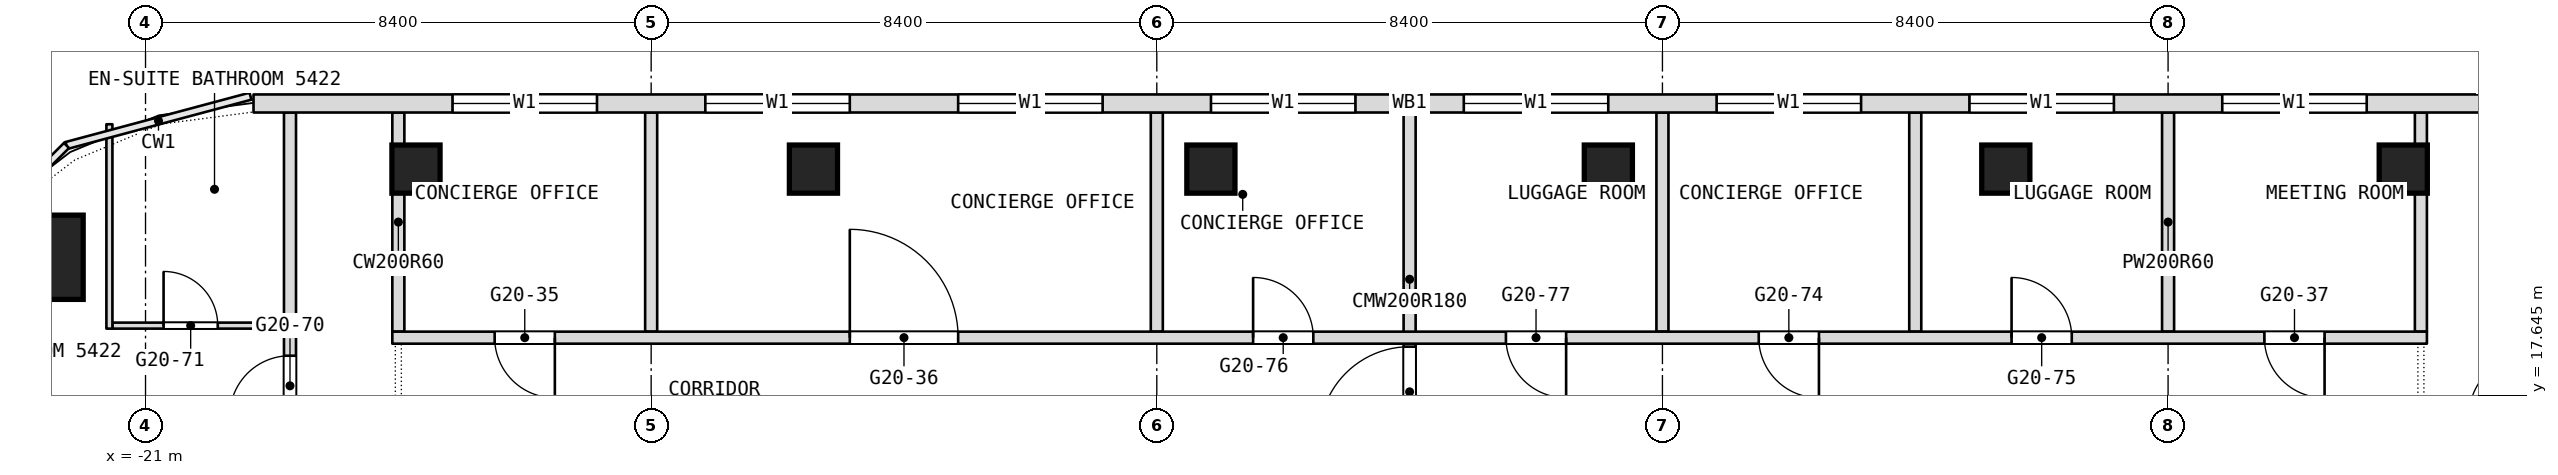
"""IFC4 building model, lengths in metres.
Left out: names, types, materials, properties, quantities, classifications, styles, units other than length and angle.
Written with IfcOpenShell. Run it as: python <this file> out.ifc"""

import sys

from ifc_helpers import new_model, si_unit, direction, frame, frame_2d, origin, origin_2d, place, context, subcontext, project, spatial, rectangle, extrude, element, fill, save


model = new_model("IFC4")
c1 = context("Model", 3, precision=1e-05, world=origin(), true_north=direction((0.0, 1.0)))
c2 = subcontext(c1, "Body", "Model", "MODEL_VIEW")
j1 = project(units=[si_unit("LENGTHUNIT", "METRE"), si_unit("PLANEANGLEUNIT", "RADIAN")], contexts=[c1])
p1 = place(None, origin())
s1 = spatial("IfcSite", under=j1, at=p1, CompositionType="ELEMENT")
p2 = place(p1, origin())
s2 = spatial("IfcBuilding", under=s1, at=p2, CompositionType="ELEMENT")
p3 = place(p2, frame((0.0, 0.0, 230.9)))
s3 = spatial("IfcBuildingStorey", under=s2, at=p3, CompositionType="ELEMENT", Elevation=230.9)
p4 = place(p3, frame((-22.736, 19.936, 0.0), z_axis=(0.0, 0.0, 1.0), x_axis=(1.0, 0.0, 0.0)))
e1 = element("IfcColumn", 1, at=p4, inside=s3, PredefinedType="COLUMN", context=c2, shape_type="SweptSolid", body=[
    extrude(rectangle(XDim=1.4, YDim=1.4, at=origin_2d()), origin(), (0.0, 0.0, 1.0), 3.6),
])
for number, where, z_axis, x_axis in (
    (2, (-16.507, 21.4, 0.0), (0.0, 0.0, 1.0), (1.0, 0.0, 0.0)),
    (3, (-9.904, 21.4, 0.0), (0.0, 0.0, 1.0), (1.0, 0.0, 0.0)),
    (4, (-3.302, 21.4, 0.0), (0.0, 0.0, 1.0), (1.0, 0.0, 0.0)),
    (5, (3.302, 21.4, 0.0), (0.0, 0.0, 1.0), (1.0, 0.0, 0.0)),
    (6, (9.904, 21.4, 0.0), (0.0, 0.0, 1.0), (1.0, 0.0, 0.0)),
    (7, (16.507, 21.4, 0.0), (0.0, 0.0, 1.0), (1.0, 0.0, 0.0)),
):
    element("IfcColumn", number, at=place(p3, frame(where, z_axis=z_axis, x_axis=x_axis)), inside=s3, PredefinedType="COLUMN", context=c2, shape_type="SweptSolid", body=[
        extrude(rectangle(XDim=0.8, YDim=0.8, at=origin_2d()), origin(), (0.0, 0.0, 1.0), 3.6),
    ])
for number, where, z_axis, x_axis in (
    (8, (16.8, 18.7, 0.0), (0.0, 0.0, 1.0), (0.0, 1.0, 0.0)),
    (9, (12.6, 18.7, 0.0), (0.0, 0.0, 1.0), (0.0, 1.0, 0.0)),
    (10, (8.4, 18.7, 0.0), (0.0, 0.0, 1.0), (0.0, 1.0, 0.0)),
    (11, (4.2, 18.7, 0.0), (0.0, 0.0, 1.0), (0.0, 1.0, 0.0)),
):
    element("IfcWall", number, at=place(p3, frame(where, z_axis=z_axis, x_axis=x_axis)), inside=s3, PredefinedType="PARTITIONING", context=c2, shape_type="SweptSolid", body=[
        extrude(rectangle(XDim=3.64, YDim=0.2, at=frame_2d((1.82, 0.0))), origin(), (0.0, 0.0, 1.0), 3.34),
    ])
p5 = place(p3, frame((0.0, 16.8, 0.0), z_axis=(0.0, 0.0, 1.0), x_axis=(0.0, 1.0, 0.0)))
e12 = element("IfcWall", 12, at=p5, inside=s3, PredefinedType="PARTITIONING", context=c2, shape_type="SweptSolid", body=[
    extrude(rectangle(XDim=5.54, YDim=0.2, at=frame_2d((2.77, 0.0))), origin(), (0.0, 0.0, 1.0), 3.34),
])
p6 = place(p5, frame((0.15, 0.0, 0.0)))
e13 = element("IfcOpeningElement", 13, at=p6, cuts=e12, PredefinedType="OPENING", context=c2, shape_type="SweptSolid", body=[
    extrude(rectangle(XDim=1.5, YDim=2.1, at=frame_2d((0.75, 1.05))), frame((0.0, 0.1, 0.0), z_axis=(0.0, -1.0, 0.0), x_axis=(1.0, 0.0, 0.0)), (0.0, 0.0, 1.0), 0.2),
])
for number, where, z_axis, x_axis in (
    (14, (-4.2, 18.7, 0.0), (0.0, 0.0, 1.0), (0.0, 1.0, 0.0)),
    (15, (-12.6, 18.7, 0.0), (0.0, 0.0, 1.0), (0.0, 1.0, 0.0)),
    (16, (-16.8, 18.7, 0.0), (0.0, 0.0, 1.0), (0.0, 1.0, 0.0)),
):
    element("IfcWall", number, at=place(p3, frame(where, z_axis=z_axis, x_axis=x_axis)), inside=s3, PredefinedType="PARTITIONING", context=c2, shape_type="SweptSolid", body=[
        extrude(rectangle(XDim=3.64, YDim=0.2, at=frame_2d((1.82, 0.0))), origin(), (0.0, 0.0, 1.0), 3.34),
    ])
p7 = place(p3, frame((-18.6, -26.751, 0.0), z_axis=(0.0, 0.0, 1.0), x_axis=(0.0, 1.0, 0.0)))
e17 = element("IfcWall", 17, at=p7, inside=s3, PredefinedType="PARTITIONING", context=c2, shape_type="SweptSolid", body=[
    extrude(rectangle(XDim=49.091, YDim=0.2, at=frame_2d((24.545, 0.0))), origin(), (0.0, 0.0, 1.0), 3.34),
])
p8 = place(p7, frame((3.413, 0.0, 0.0)))
e18 = element("IfcOpeningElement", 18, at=p8, cuts=e17, PredefinedType="OPENING", context=c2, shape_type="SweptSolid", body=[
    extrude(rectangle(XDim=1.0, YDim=2.1, at=frame_2d((0.5, 1.05))), frame((0.0, 0.1, 0.0), z_axis=(0.0, -1.0, 0.0), x_axis=(1.0, 0.0, 0.0)), (0.0, 0.0, 1.0), 0.2),
])
p9 = place(p7, frame((5.838, 0.0, 0.0)))
e19 = element("IfcOpeningElement", 19, at=p9, cuts=e17, PredefinedType="OPENING", context=c2, shape_type="SweptSolid", body=[
    extrude(rectangle(XDim=1.0, YDim=2.1, at=frame_2d((0.5, 1.05))), frame((0.0, 0.1, 0.0), z_axis=(0.0, -1.0, 0.0), x_axis=(1.0, 0.0, 0.0)), (0.0, 0.0, 1.0), 0.2),
])
p10 = place(p7, frame((13.551, 0.0, 0.0)))
e20 = element("IfcOpeningElement", 20, at=p10, cuts=e17, PredefinedType="OPENING", context=c2, shape_type="SweptSolid", body=[
    extrude(rectangle(XDim=1.1, YDim=2.1, at=frame_2d((0.55, 1.05))), frame((0.0, 0.1, 0.0), z_axis=(0.0, -1.0, 0.0), x_axis=(1.0, 0.0, 0.0)), (0.0, 0.0, 1.0), 0.2),
])
p11 = place(p7, frame((22.051, 0.0, 0.0)))
e21 = element("IfcOpeningElement", 21, at=p11, cuts=e17, PredefinedType="OPENING", context=c2, shape_type="SweptSolid", body=[
    extrude(rectangle(XDim=1.1, YDim=2.1, at=frame_2d((0.55, 1.05))), frame((0.0, 0.1, 0.0), z_axis=(0.0, -1.0, 0.0), x_axis=(1.0, 0.0, 0.0)), (0.0, 0.0, 1.0), 0.2),
])
p12 = place(p7, frame((27.151, 0.0, 0.0)))
e22 = element("IfcOpeningElement", 22, at=p12, cuts=e17, PredefinedType="OPENING", context=c2, shape_type="SweptSolid", body=[
    extrude(rectangle(XDim=1.0, YDim=2.1, at=frame_2d((0.5, 1.05))), frame((0.0, 0.1, 0.0), z_axis=(0.0, -1.0, 0.0), x_axis=(1.0, 0.0, 0.0)), (0.0, 0.0, 1.0), 0.2),
])
p13 = place(p7, frame((33.751, 0.0, 0.0)))
e23 = element("IfcOpeningElement", 23, at=p13, cuts=e17, PredefinedType="OPENING", context=c2, shape_type="SweptSolid", body=[
    extrude(rectangle(XDim=1.0, YDim=2.1, at=frame_2d((0.5, 1.05))), frame((0.0, 0.1, 0.0), z_axis=(0.0, -1.0, 0.0), x_axis=(1.0, 0.0, 0.0)), (0.0, 0.0, 1.0), 0.2),
])
p14 = place(p7, frame((37.951, 0.0, 0.0)))
e24 = element("IfcOpeningElement", 24, at=p14, cuts=e17, PredefinedType="OPENING", context=c2, shape_type="SweptSolid", body=[
    extrude(rectangle(XDim=1.0, YDim=2.1, at=frame_2d((0.5, 1.05))), frame((0.0, 0.1, 0.0), z_axis=(0.0, -1.0, 0.0), x_axis=(1.0, 0.0, 0.0)), (0.0, 0.0, 1.0), 0.2),
])
p15 = place(p7, frame((39.751, 0.0, 0.0)))
e25 = element("IfcOpeningElement", 25, at=p15, cuts=e17, PredefinedType="OPENING", context=c2, shape_type="SweptSolid", body=[
    extrude(rectangle(XDim=1.0, YDim=2.1, at=frame_2d((0.5, 1.05))), frame((0.0, 0.1, 0.0), z_axis=(0.0, -1.0, 0.0), x_axis=(1.0, 0.0, 0.0)), (0.0, 0.0, 1.0), 0.2),
])
p16 = place(p7, frame((44.051, 0.0, 0.0)))
e26 = element("IfcOpeningElement", 26, at=p16, cuts=e17, PredefinedType="OPENING", context=c2, shape_type="SweptSolid", body=[
    extrude(rectangle(XDim=1.0, YDim=2.1, at=frame_2d((0.5, 1.05))), frame((0.0, 0.1, 0.0), z_axis=(0.0, -1.0, 0.0), x_axis=(1.0, 0.0, 0.0)), (0.0, 0.0, 1.0), 0.2),
])
p17 = place(p3, frame((-16.9, 18.6, 0.0), z_axis=(0.0, 0.0, 1.0), x_axis=(1.0, 0.0, 0.0)))
e27 = element("IfcWall", 27, at=p17, inside=s3, PredefinedType="PARTITIONING", context=c2, shape_type="SweptSolid", body=[
    extrude(rectangle(XDim=33.8, YDim=0.2, at=frame_2d((16.9, 0.0))), origin(), (0.0, 0.0, 1.0), 3.34),
])
p18 = place(p17, frame((1.7, 0.0, 0.0)))
e28 = element("IfcOpeningElement", 28, at=p18, cuts=e27, PredefinedType="OPENING", context=c2, shape_type="SweptSolid", body=[
    extrude(rectangle(XDim=1.0, YDim=2.1, at=frame_2d((0.5, 1.05))), frame((0.0, 0.1, 0.0), z_axis=(0.0, -1.0, 0.0), x_axis=(1.0, 0.0, 0.0)), (0.0, 0.0, 1.0), 0.2),
])
p19 = place(p17, frame((7.6, 0.0, 0.0)))
e29 = element("IfcOpeningElement", 29, at=p19, cuts=e27, PredefinedType="OPENING", context=c2, shape_type="SweptSolid", body=[
    extrude(rectangle(XDim=1.8, YDim=2.1, at=frame_2d((0.9, 1.05))), frame((0.0, 0.1, 0.0), z_axis=(0.0, -1.0, 0.0), x_axis=(1.0, 0.0, 0.0)), (0.0, 0.0, 1.0), 0.2),
])
p20 = place(p17, frame((31.1, 0.0, 0.0)))
e30 = element("IfcOpeningElement", 30, at=p20, cuts=e27, PredefinedType="OPENING", context=c2, shape_type="SweptSolid", body=[
    extrude(rectangle(XDim=1.0, YDim=2.1, at=frame_2d((0.5, 1.05))), frame((0.0, 0.1, 0.0), z_axis=(0.0, -1.0, 0.0), x_axis=(1.0, 0.0, 0.0)), (0.0, 0.0, 1.0), 0.2),
])
p21 = place(p17, frame((22.7, 0.0, 0.0)))
e31 = element("IfcOpeningElement", 31, at=p21, cuts=e27, PredefinedType="OPENING", context=c2, shape_type="SweptSolid", body=[
    extrude(rectangle(XDim=1.0, YDim=2.1, at=frame_2d((0.5, 1.05))), frame((0.0, 0.1, 0.0), z_axis=(0.0, -1.0, 0.0), x_axis=(1.0, 0.0, 0.0)), (0.0, 0.0, 1.0), 0.2),
])
p22 = place(p17, frame((26.9, 0.0, 0.0)))
e32 = element("IfcOpeningElement", 32, at=p22, cuts=e27, PredefinedType="OPENING", context=c2, shape_type="SweptSolid", body=[
    extrude(rectangle(XDim=1.0, YDim=2.1, at=frame_2d((0.5, 1.05))), frame((0.0, 0.1, 0.0), z_axis=(0.0, -1.0, 0.0), x_axis=(1.0, 0.0, 0.0)), (0.0, 0.0, 1.0), 0.2),
])
p23 = place(p17, frame((14.3, 0.0, 0.0)))
e33 = element("IfcOpeningElement", 33, at=p23, cuts=e27, PredefinedType="OPENING", context=c2, shape_type="SweptSolid", body=[
    extrude(rectangle(XDim=1.0, YDim=2.1, at=frame_2d((0.5, 1.05))), frame((0.0, 0.1, 0.0), z_axis=(0.0, -1.0, 0.0), x_axis=(1.0, 0.0, 0.0)), (0.0, 0.0, 1.0), 0.2),
])
p24 = place(p17, frame((18.5, 0.0, 0.0)))
e34 = element("IfcOpeningElement", 34, at=p24, cuts=e27, PredefinedType="OPENING", context=c2, shape_type="SweptSolid", body=[
    extrude(rectangle(XDim=1.0, YDim=2.1, at=frame_2d((0.5, 1.05))), frame((0.0, 0.1, 0.0), z_axis=(0.0, -1.0, 0.0), x_axis=(1.0, 0.0, 0.0)), (0.0, 0.0, 1.0), 0.2),
])
p25 = place(p3, frame((-21.55, 18.8, 0.0), z_axis=(0.0, 0.0, 1.0), x_axis=(1.0, 0.0, 0.0)))
e35 = element("IfcWall", 35, at=p25, inside=s3, PredefinedType="PARTITIONING", context=c2, shape_type="SweptSolid", body=[
    extrude(rectangle(XDim=2.85, YDim=0.1, at=frame_2d((1.425, 0.0))), origin(), (0.0, 0.0, 1.0), 3.34),
])
p26 = place(p25, frame((0.85, 0.0, 0.0)))
e36 = element("IfcOpeningElement", 36, at=p26, cuts=e35, PredefinedType="OPENING", context=c2, shape_type="SweptSolid", body=[
    extrude(rectangle(XDim=0.9, YDim=2.1, at=frame_2d((0.45, 1.05))), frame((0.0, 0.05, 0.0), z_axis=(0.0, -1.0, 0.0), x_axis=(1.0, 0.0, 0.0)), (0.0, 0.0, 1.0), 0.1),
])
p27 = place(p3, frame((-21.6, 18.75, 0.0), z_axis=(0.0, 0.0, 1.0), x_axis=(0.0, 1.0, 0.0)))
e37 = element("IfcWall", 37, at=p27, inside=s3, PredefinedType="PARTITIONING", context=c2, shape_type="SweptSolid", body=[
    extrude(rectangle(XDim=3.395, YDim=0.1, at=frame_2d((1.698, 0.0))), origin(), (0.0, 0.0, 1.0), 3.34),
])
p28 = place(p3, frame((19.206, 22.49, 0.0), z_axis=(0.0, 0.0, 1.0), x_axis=(-1.0, 0.0, 0.0)))
e38 = element("IfcWall", 38, at=p28, inside=s3, PredefinedType="NOTDEFINED", context=c2, shape_type="SweptSolid", body=[
    extrude(rectangle(XDim=38.412, YDim=0.3, at=frame_2d((19.206, 0.0))), origin(), (0.0, 0.0, 1.0), 3.6),
])
p29 = place(p28, frame((3.306, 0.0, 0.9)))
e39 = element("IfcOpeningElement", 39, at=p29, cuts=e38, PredefinedType="OPENING", context=c2, shape_type="SweptSolid", body=[
    extrude(rectangle(XDim=2.4, YDim=2.1, at=frame_2d((1.2, 1.05))), frame((0.0, 0.15, 0.0), z_axis=(0.0, -1.0, 0.0), x_axis=(1.0, 0.0, 0.0)), (0.0, 0.0, 1.0), 0.3),
])
p30 = place(p28, frame((7.506, 0.0, 0.9)))
e40 = element("IfcOpeningElement", 40, at=p30, cuts=e38, PredefinedType="OPENING", context=c2, shape_type="SweptSolid", body=[
    extrude(rectangle(XDim=2.4, YDim=2.1, at=frame_2d((1.2, 1.05))), frame((0.0, 0.15, 0.0), z_axis=(0.0, -1.0, 0.0), x_axis=(1.0, 0.0, 0.0)), (0.0, 0.0, 1.0), 0.3),
])
p31 = place(p28, frame((11.706, 0.0, 0.9)))
e41 = element("IfcOpeningElement", 41, at=p31, cuts=e38, PredefinedType="OPENING", context=c2, shape_type="SweptSolid", body=[
    extrude(rectangle(XDim=2.4, YDim=2.1, at=frame_2d((1.2, 1.05))), frame((0.0, 0.15, 0.0), z_axis=(0.0, -1.0, 0.0), x_axis=(1.0, 0.0, 0.0)), (0.0, 0.0, 1.0), 0.3),
])
p32 = place(p28, frame((15.906, 0.0, 0.9)))
e42 = element("IfcOpeningElement", 42, at=p32, cuts=e38, PredefinedType="OPENING", context=c2, shape_type="SweptSolid", body=[
    extrude(rectangle(XDim=2.4, YDim=2.1, at=frame_2d((1.2, 1.05))), frame((0.0, 0.15, 0.0), z_axis=(0.0, -1.0, 0.0), x_axis=(1.0, 0.0, 0.0)), (0.0, 0.0, 1.0), 0.3),
])
p33 = place(p28, frame((20.106, 0.0, 0.9)))
e43 = element("IfcOpeningElement", 43, at=p33, cuts=e38, PredefinedType="OPENING", context=c2, shape_type="SweptSolid", body=[
    extrude(rectangle(XDim=2.4, YDim=2.1, at=frame_2d((1.2, 1.05))), frame((0.0, 0.15, 0.0), z_axis=(0.0, -1.0, 0.0), x_axis=(1.0, 0.0, 0.0)), (0.0, 0.0, 1.0), 0.3),
])
p34 = place(p28, frame((24.306, 0.0, 0.9)))
e44 = element("IfcOpeningElement", 44, at=p34, cuts=e38, PredefinedType="OPENING", context=c2, shape_type="SweptSolid", body=[
    extrude(rectangle(XDim=2.4, YDim=2.1, at=frame_2d((1.2, 1.05))), frame((0.0, 0.15, 0.0), z_axis=(0.0, -1.0, 0.0), x_axis=(1.0, 0.0, 0.0)), (0.0, 0.0, 1.0), 0.3),
])
p35 = place(p28, frame((28.506, 0.0, 0.9)))
e45 = element("IfcOpeningElement", 45, at=p35, cuts=e38, PredefinedType="OPENING", context=c2, shape_type="SweptSolid", body=[
    extrude(rectangle(XDim=2.4, YDim=2.1, at=frame_2d((1.2, 1.05))), frame((0.0, 0.15, 0.0), z_axis=(0.0, -1.0, 0.0), x_axis=(1.0, 0.0, 0.0)), (0.0, 0.0, 1.0), 0.3),
])
p36 = place(p28, frame((32.706, 0.0, 0.9)))
e46 = element("IfcOpeningElement", 46, at=p36, cuts=e38, PredefinedType="OPENING", context=c2, shape_type="SweptSolid", body=[
    extrude(rectangle(XDim=2.4, YDim=2.1, at=frame_2d((1.2, 1.05))), frame((0.0, 0.15, 0.0), z_axis=(0.0, -1.0, 0.0), x_axis=(1.0, 0.0, 0.0)), (0.0, 0.0, 1.0), 0.3),
])
p37 = place(p16, origin())
e47 = element("IfcDoor", 47, at=p37, inside=s3, OperationType="SINGLE_SWING_LEFT", PredefinedType="DOOR", context=c2, shape_type="SweptSolid", body=[
    extrude(rectangle(XDim=1.0, YDim=2.1, at=frame_2d((0.5, 1.05))), frame((0.0, 0.025, 0.0), z_axis=(0.0, -1.0, 0.0), x_axis=(1.0, 0.0, 0.0)), (0.0, 0.0, 1.0), 0.05),
])
fill(e26, e47)
p38 = place(p18, origin())
e48 = element("IfcDoor", 48, at=p38, inside=s3, OperationType="SINGLE_SWING_LEFT", PredefinedType="DOOR", context=c2, shape_type="SweptSolid", body=[
    extrude(rectangle(XDim=1.0, YDim=2.1, at=frame_2d((0.5, 1.05))), frame((0.0, 0.025, 0.0), z_axis=(0.0, -1.0, 0.0), x_axis=(1.0, 0.0, 0.0)), (0.0, 0.0, 1.0), 0.05),
])
fill(e28, e48)
p39 = place(p19, origin())
e49 = element("IfcDoor", 49, at=p39, inside=s3, OperationType="DOUBLE_DOOR_SINGLE_SWING", PredefinedType="DOOR", context=c2, shape_type="SweptSolid", body=[
    extrude(rectangle(XDim=1.8, YDim=2.1, at=frame_2d((0.9, 1.05))), frame((0.0, 0.025, 0.0), z_axis=(0.0, -1.0, 0.0), x_axis=(1.0, 0.0, 0.0)), (0.0, 0.0, 1.0), 0.05),
])
fill(e29, e49)
p40 = place(p20, origin())
e50 = element("IfcDoor", 50, at=p40, inside=s3, OperationType="SINGLE_SWING_LEFT", PredefinedType="DOOR", context=c2, shape_type="SweptSolid", body=[
    extrude(rectangle(XDim=1.0, YDim=2.1, at=frame_2d((0.5, 1.05))), frame((0.0, 0.025, 0.0), z_axis=(0.0, -1.0, 0.0), x_axis=(1.0, 0.0, 0.0)), (0.0, 0.0, 1.0), 0.05),
])
fill(e30, e50)
p41 = place(p21, origin())
e51 = element("IfcDoor", 51, at=p41, inside=s3, OperationType="SINGLE_SWING_RIGHT", PredefinedType="DOOR", context=c2, shape_type="SweptSolid", body=[
    extrude(rectangle(XDim=1.0, YDim=2.1, at=frame_2d((0.5, 1.05))), frame((0.0, 0.025, 0.0), z_axis=(0.0, -1.0, 0.0), x_axis=(1.0, 0.0, 0.0)), (0.0, 0.0, 1.0), 0.05),
])
fill(e31, e51)
p42 = place(p22, origin())
e52 = element("IfcDoor", 52, at=p42, inside=s3, OperationType="SINGLE_SWING_LEFT", PredefinedType="DOOR", context=c2, shape_type="SweptSolid", body=[
    extrude(rectangle(XDim=1.0, YDim=2.1, at=frame_2d((0.5, 1.05))), frame((0.0, 0.025, 0.0), z_axis=(0.0, -1.0, 0.0), x_axis=(1.0, 0.0, 0.0)), (0.0, 0.0, 1.0), 0.05),
])
fill(e32, e52)
p43 = place(p23, origin())
e53 = element("IfcDoor", 53, at=p43, inside=s3, OperationType="SINGLE_SWING_RIGHT", PredefinedType="DOOR", context=c2, shape_type="SweptSolid", body=[
    extrude(rectangle(XDim=1.0, YDim=2.1, at=frame_2d((0.5, 1.05))), frame((0.0, 0.025, 0.0), z_axis=(0.0, -1.0, 0.0), x_axis=(1.0, 0.0, 0.0)), (0.0, 0.0, 1.0), 0.05),
])
fill(e33, e53)
p44 = place(p24, origin())
e54 = element("IfcDoor", 54, at=p44, inside=s3, OperationType="SINGLE_SWING_LEFT", PredefinedType="DOOR", context=c2, shape_type="SweptSolid", body=[
    extrude(rectangle(XDim=1.0, YDim=2.1, at=frame_2d((0.5, 1.05))), frame((0.0, 0.025, 0.0), z_axis=(0.0, -1.0, 0.0), x_axis=(1.0, 0.0, 0.0)), (0.0, 0.0, 1.0), 0.05),
])
fill(e34, e54)
p45 = place(p26, origin())
e55 = element("IfcDoor", 55, at=p45, inside=s3, OperationType="SINGLE_SWING_LEFT", PredefinedType="DOOR", context=c2, shape_type="SweptSolid", body=[
    extrude(rectangle(XDim=0.9, YDim=2.1, at=frame_2d((0.45, 1.05))), frame((0.0, 0.025, 0.0), z_axis=(0.0, -1.0, 0.0), x_axis=(1.0, 0.0, 0.0)), (0.0, 0.0, 1.0), 0.05),
])
fill(e36, e55)
p46 = place(p29, origin())
e56 = element("IfcWindow", 56, at=p46, inside=s3, PartitioningType="SINGLE_PANEL", PredefinedType="WINDOW", context=c2, shape_type="SweptSolid", body=[
    extrude(rectangle(XDim=2.4, YDim=2.1, at=frame_2d((1.2, 1.05))), frame((0.0, 0.03, 0.0), z_axis=(0.0, -1.0, 0.0), x_axis=(1.0, 0.0, 0.0)), (0.0, 0.0, 1.0), 0.06),
])
fill(e39, e56)
p47 = place(p30, origin())
e57 = element("IfcWindow", 57, at=p47, inside=s3, PartitioningType="SINGLE_PANEL", PredefinedType="WINDOW", context=c2, shape_type="SweptSolid", body=[
    extrude(rectangle(XDim=2.4, YDim=2.1, at=frame_2d((1.2, 1.05))), frame((0.0, 0.03, 0.0), z_axis=(0.0, -1.0, 0.0), x_axis=(1.0, 0.0, 0.0)), (0.0, 0.0, 1.0), 0.06),
])
fill(e40, e57)
p48 = place(p31, origin())
e58 = element("IfcWindow", 58, at=p48, inside=s3, PartitioningType="SINGLE_PANEL", PredefinedType="WINDOW", context=c2, shape_type="SweptSolid", body=[
    extrude(rectangle(XDim=2.4, YDim=2.1, at=frame_2d((1.2, 1.05))), frame((0.0, 0.03, 0.0), z_axis=(0.0, -1.0, 0.0), x_axis=(1.0, 0.0, 0.0)), (0.0, 0.0, 1.0), 0.06),
])
fill(e41, e58)
p49 = place(p32, origin())
e59 = element("IfcWindow", 59, at=p49, inside=s3, PartitioningType="SINGLE_PANEL", PredefinedType="WINDOW", context=c2, shape_type="SweptSolid", body=[
    extrude(rectangle(XDim=2.4, YDim=2.1, at=frame_2d((1.2, 1.05))), frame((0.0, 0.03, 0.0), z_axis=(0.0, -1.0, 0.0), x_axis=(1.0, 0.0, 0.0)), (0.0, 0.0, 1.0), 0.06),
])
fill(e42, e59)
p50 = place(p33, origin())
e60 = element("IfcWindow", 60, at=p50, inside=s3, PartitioningType="SINGLE_PANEL", PredefinedType="WINDOW", context=c2, shape_type="SweptSolid", body=[
    extrude(rectangle(XDim=2.4, YDim=2.1, at=frame_2d((1.2, 1.05))), frame((0.0, 0.03, 0.0), z_axis=(0.0, -1.0, 0.0), x_axis=(1.0, 0.0, 0.0)), (0.0, 0.0, 1.0), 0.06),
])
fill(e43, e60)
p51 = place(p34, origin())
e61 = element("IfcWindow", 61, at=p51, inside=s3, PartitioningType="SINGLE_PANEL", PredefinedType="WINDOW", context=c2, shape_type="SweptSolid", body=[
    extrude(rectangle(XDim=2.4, YDim=2.1, at=frame_2d((1.2, 1.05))), frame((0.0, 0.03, 0.0), z_axis=(0.0, -1.0, 0.0), x_axis=(1.0, 0.0, 0.0)), (0.0, 0.0, 1.0), 0.06),
])
fill(e44, e61)
p52 = place(p35, origin())
e62 = element("IfcWindow", 62, at=p52, inside=s3, PartitioningType="SINGLE_PANEL", PredefinedType="WINDOW", context=c2, shape_type="SweptSolid", body=[
    extrude(rectangle(XDim=2.4, YDim=2.1, at=frame_2d((1.2, 1.05))), frame((0.0, 0.03, 0.0), z_axis=(0.0, -1.0, 0.0), x_axis=(1.0, 0.0, 0.0)), (0.0, 0.0, 1.0), 0.06),
])
fill(e45, e62)
p53 = place(p36, origin())
e63 = element("IfcWindow", 63, at=p53, inside=s3, PartitioningType="SINGLE_PANEL", PredefinedType="WINDOW", context=c2, shape_type="SweptSolid", body=[
    extrude(rectangle(XDim=2.4, YDim=2.1, at=frame_2d((1.2, 1.05))), frame((0.0, 0.03, 0.0), z_axis=(0.0, -1.0, 0.0), x_axis=(1.0, 0.0, 0.0)), (0.0, 0.0, 1.0), 0.06),
])
fill(e46, e63)
p54 = place(p6, origin())
e64 = element("IfcDoor", 64, at=p54, inside=s3, OperationType="DOUBLE_DOOR_DOUBLE_SWING", PredefinedType="DOOR", context=c2, shape_type="SweptSolid", body=[
    extrude(rectangle(XDim=1.5, YDim=2.1, at=frame_2d((0.75, 1.05))), frame((0.0, 0.025, 0.0), z_axis=(0.0, -1.0, 0.0), x_axis=(1.0, 0.0, 0.0)), (0.0, 0.0, 1.0), 0.05),
])
fill(e13, e64)
save(model, sys.argv[1])
